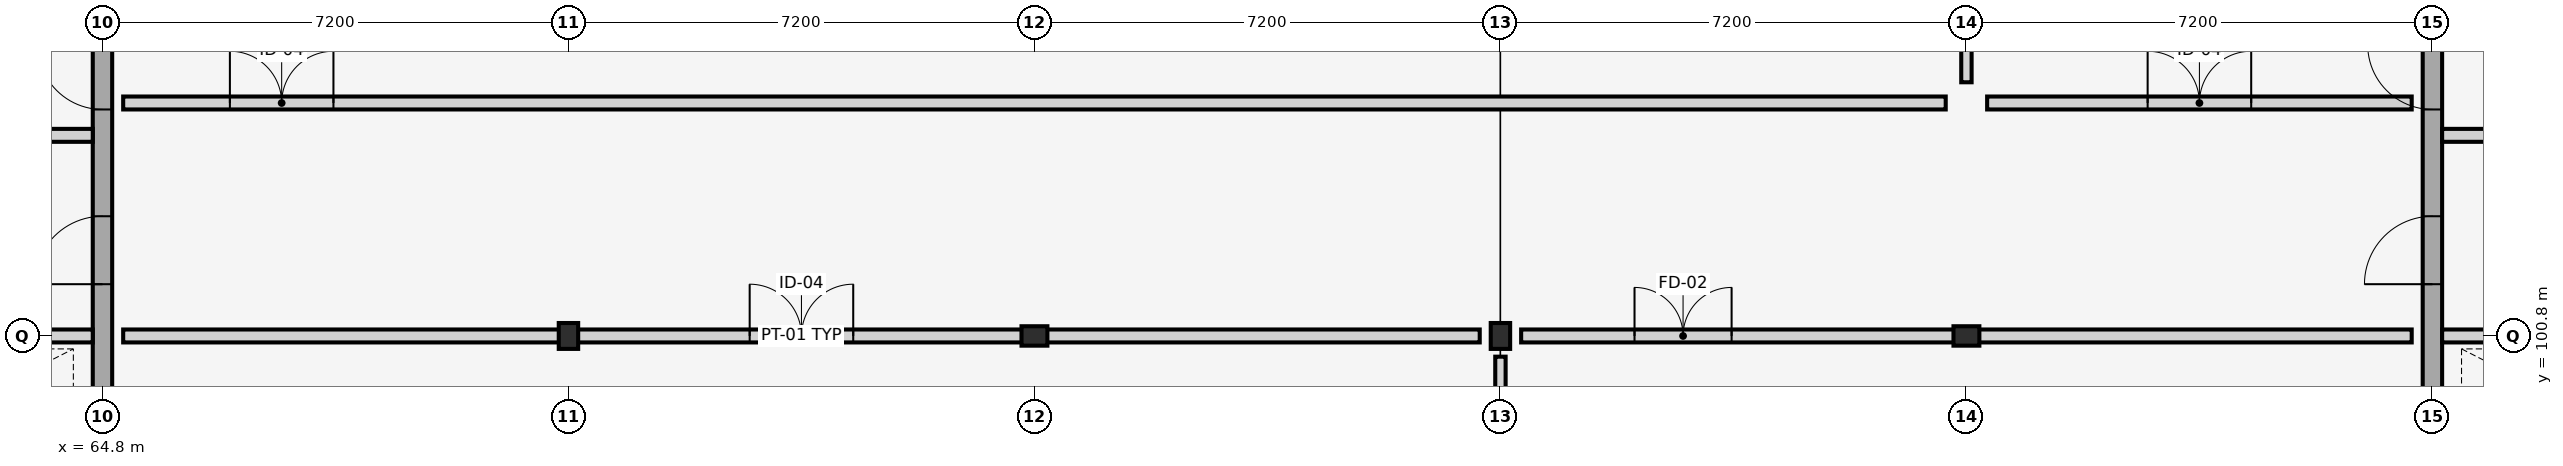
"""IFC4 building model, lengths in metres.
Left out: names, types, materials, properties, quantities, classifications, styles, units other than length and angle.
Written with IfcOpenShell. Run it as: python <this file> out.ifc"""

import sys

from ifc_helpers import new_model, si_unit, direction, frame, frame_2d, origin, origin_2d, place, context, subcontext, project, spatial, rectangle, i_section, extrude, element, fill, save


model = new_model("IFC4")
c1 = context("Model", 3, precision=1e-05, world=origin(), true_north=direction((0.0, 1.0)))
c2 = subcontext(c1, "Body", "Model", "MODEL_VIEW")
j1 = project(units=[si_unit("LENGTHUNIT", "METRE"), si_unit("PLANEANGLEUNIT", "RADIAN")], contexts=[c1])
p1 = place(None, origin())
s1 = spatial("IfcSite", under=j1, at=p1, CompositionType="ELEMENT")
p2 = place(p1, origin())
s2 = spatial("IfcBuilding", under=s1, at=p2, CompositionType="ELEMENT")
p3 = place(p2, frame((0.0, 0.0, 8.7)))
s3 = spatial("IfcBuildingStorey", under=s2, at=p3, CompositionType="ELEMENT", Elevation=8.7)
for number, where, z_axis, x_axis in (
    (1, (72.0, 100.8, 0.0), (0.0, 0.0, 1.0), (1.0, 0.0, 0.0)),
    (2, (79.2, 100.8, 0.0), (0.0, 0.0, 1.0), (0.0, 1.0, 0.0)),
    (3, (86.4, 100.8, 0.0), (0.0, 0.0, 1.0), (1.0, 0.0, 0.0)),
    (4, (93.6, 100.8, 0.0), (0.0, 0.0, 1.0), (0.0, 1.0, 0.0)),
):
    element("IfcColumn", number, at=place(p3, frame(where, z_axis=z_axis, x_axis=x_axis)), inside=s3, PredefinedType="COLUMN", context=c2, shape_type="SweptSolid", body=[
        extrude(i_section(OverallWidth=0.3, OverallDepth=0.4, WebThickness=0.013, FlangeThickness=0.024, FilletRadius=0.027, at=origin_2d()), origin(), (0.0, 0.0, 1.0), 4.2),
    ])
p4 = place(p3, frame((64.8, 93.75, 0.0), z_axis=(0.0, 0.0, 1.0), x_axis=(0.0, 1.0, 0.0)))
e5 = element("IfcWall", 5, at=p4, inside=s3, PredefinedType="SHEAR", context=c2, shape_type="SweptSolid", body=[
    extrude(rectangle(XDim=14.1, YDim=0.3, at=frame_2d((7.05, 0.0))), origin(), (0.0, 0.0, 1.0), 3.96),
])
p5 = place(p4, frame((3.55, 0.0, 0.0)))
e6 = element("IfcOpeningElement", 6, at=p5, cuts=e5, PredefinedType="OPENING", context=c2, shape_type="SweptSolid", body=[
    extrude(rectangle(XDim=1.3, YDim=2.2, at=frame_2d((0.65, 1.1))), frame((0.0, 0.16, 0.0), z_axis=(0.0, -1.0, 0.0), x_axis=(1.0, 0.0, 0.0)), (0.0, 0.0, 1.0), 0.32),
])
p6 = place(p4, frame((7.85, 0.0, 0.0)))
e7 = element("IfcOpeningElement", 7, at=p6, cuts=e5, PredefinedType="OPENING", context=c2, shape_type="SweptSolid", body=[
    extrude(rectangle(XDim=1.05, YDim=2.15, at=frame_2d((0.525, 1.075))), frame((0.0, 0.16, 0.0), z_axis=(0.0, -1.0, 0.0), x_axis=(1.0, 0.0, 0.0)), (0.0, 0.0, 1.0), 0.32),
])
p7 = place(p4, frame((10.55, 0.0, 0.0)))
e8 = element("IfcOpeningElement", 8, at=p7, cuts=e5, PredefinedType="OPENING", context=c2, shape_type="SweptSolid", body=[
    extrude(rectangle(XDim=1.0, YDim=2.15, at=frame_2d((0.5, 1.075))), frame((0.0, 0.16, 0.0), z_axis=(0.0, -1.0, 0.0), x_axis=(1.0, 0.0, 0.0)), (0.0, 0.0, 1.0), 0.32),
])
for number, where, z_axis, x_axis in (
    (9, (61.1, 100.8, 0.0), (0.0, 0.0, 1.0), (1.0, 0.0, 0.0)),
    (10, (61.1, 103.9, 0.0), (0.0, 0.0, 1.0), (1.0, 0.0, 0.0)),
):
    element("IfcWall", number, at=place(p3, frame(where, z_axis=z_axis, x_axis=x_axis)), inside=s3, PredefinedType="PLUMBINGWALL", context=c2, shape_type="SweptSolid", body=[
        extrude(rectangle(XDim=3.55, YDim=0.2, at=frame_2d((1.775, 0.0))), origin(), (0.0, 0.0, 1.0), 3.38),
    ])
p8 = place(p3, frame((100.8, 93.75, 0.0), z_axis=(0.0, 0.0, 1.0), x_axis=(0.0, 1.0, 0.0)))
e11 = element("IfcWall", 11, at=p8, inside=s3, PredefinedType="SHEAR", context=c2, shape_type="SweptSolid", body=[
    extrude(rectangle(XDim=14.1, YDim=0.3, at=frame_2d((7.05, 0.0))), origin(), (0.0, 0.0, 1.0), 3.96),
])
p9 = place(p8, frame((3.55, 0.0, 0.0)))
e12 = element("IfcOpeningElement", 12, at=p9, cuts=e11, PredefinedType="OPENING", context=c2, shape_type="SweptSolid", body=[
    extrude(rectangle(XDim=1.3, YDim=2.2, at=frame_2d((0.65, 1.1))), frame((0.0, 0.16, 0.0), z_axis=(0.0, -1.0, 0.0), x_axis=(1.0, 0.0, 0.0)), (0.0, 0.0, 1.0), 0.32),
])
p10 = place(p8, frame((7.85, 0.0, 0.0)))
e13 = element("IfcOpeningElement", 13, at=p10, cuts=e11, PredefinedType="OPENING", context=c2, shape_type="SweptSolid", body=[
    extrude(rectangle(XDim=1.05, YDim=2.15, at=frame_2d((0.525, 1.075))), frame((0.0, 0.16, 0.0), z_axis=(0.0, -1.0, 0.0), x_axis=(1.0, 0.0, 0.0)), (0.0, 0.0, 1.0), 0.32),
])
p11 = place(p8, frame((10.55, 0.0, 0.0)))
e14 = element("IfcOpeningElement", 14, at=p11, cuts=e11, PredefinedType="OPENING", context=c2, shape_type="SweptSolid", body=[
    extrude(rectangle(XDim=1.0, YDim=2.15, at=frame_2d((0.5, 1.075))), frame((0.0, 0.16, 0.0), z_axis=(0.0, -1.0, 0.0), x_axis=(1.0, 0.0, 0.0)), (0.0, 0.0, 1.0), 0.32),
])
for number, where, z_axis, x_axis in (
    (15, (100.95, 100.8, 0.0), (0.0, 0.0, 1.0), (1.0, 0.0, 0.0)),
    (16, (100.95, 103.9, 0.0), (0.0, 0.0, 1.0), (1.0, 0.0, 0.0)),
):
    element("IfcWall", number, at=place(p3, frame(where, z_axis=z_axis, x_axis=x_axis)), inside=s3, PredefinedType="PLUMBINGWALL", context=c2, shape_type="SweptSolid", body=[
        extrude(rectangle(XDim=3.55, YDim=0.2, at=frame_2d((1.775, 0.0))), origin(), (0.0, 0.0, 1.0), 3.38),
    ])
p12 = place(p3, frame((65.12, 100.8, 0.0), z_axis=(0.0, 0.0, 1.0), x_axis=(1.0, 0.0, 0.0)))
e17 = element("IfcWall", 17, at=p12, inside=s3, PredefinedType="PARTITIONING", context=c2, shape_type="SweptSolid", body=[
    extrude(rectangle(XDim=20.96, YDim=0.2, at=frame_2d((10.48, 0.0))), origin(), (0.0, 0.0, 1.0), 3.15),
])
p13 = place(p12, frame((9.68, 0.0, 0.0)))
e18 = element("IfcOpeningElement", 18, at=p13, cuts=e17, PredefinedType="OPENING", context=c2, shape_type="SweptSolid", body=[
    extrude(rectangle(XDim=1.6, YDim=2.35, at=frame_2d((0.8, 1.175))), frame((0.0, 0.11, 0.0), z_axis=(0.0, -1.0, 0.0), x_axis=(1.0, 0.0, 0.0)), (0.0, 0.0, 1.0), 0.22),
])
p14 = place(p3, frame((86.72, 100.8, 0.0), z_axis=(0.0, 0.0, 1.0), x_axis=(1.0, 0.0, 0.0)))
e19 = element("IfcWall", 19, at=p14, inside=s3, PredefinedType="PARTITIONING", context=c2, shape_type="SweptSolid", body=[
    extrude(rectangle(XDim=13.76, YDim=0.2, at=frame_2d((6.88, 0.0))), origin(), (0.0, 0.0, 1.0), 3.15),
])
p15 = place(p14, frame((1.752, 0.0, 0.0)))
e20 = element("IfcOpeningElement", 20, at=p15, cuts=e19, PredefinedType="OPENING", context=c2, shape_type="SweptSolid", body=[
    extrude(rectangle(XDim=1.5, YDim=2.25, at=frame_2d((0.75, 1.125))), frame((0.0, 0.11, 0.0), z_axis=(0.0, -1.0, 0.0), x_axis=(1.0, 0.0, 0.0)), (0.0, 0.0, 1.0), 0.22),
])
p16 = place(p3, frame((65.12, 104.4, 0.0), z_axis=(0.0, 0.0, 1.0), x_axis=(1.0, 0.0, 0.0)))
e21 = element("IfcWall", 21, at=p16, inside=s3, PredefinedType="PARTITIONING", context=c2, shape_type="SweptSolid", body=[
    extrude(rectangle(XDim=28.16, YDim=0.2, at=frame_2d((14.08, 0.0))), origin(), (0.0, 0.0, 1.0), 3.15),
])
p17 = place(p16, frame((1.649, 0.0, 0.0)))
e22 = element("IfcOpeningElement", 22, at=p17, cuts=e21, PredefinedType="OPENING", context=c2, shape_type="SweptSolid", body=[
    extrude(rectangle(XDim=1.6, YDim=2.35, at=frame_2d((0.8, 1.175))), frame((0.0, 0.11, 0.0), z_axis=(0.0, -1.0, 0.0), x_axis=(1.0, 0.0, 0.0)), (0.0, 0.0, 1.0), 0.22),
])
p18 = place(p3, frame((93.92, 104.4, 0.0), z_axis=(0.0, 0.0, 1.0), x_axis=(1.0, 0.0, 0.0)))
e23 = element("IfcWall", 23, at=p18, inside=s3, PredefinedType="PARTITIONING", context=c2, shape_type="SweptSolid", body=[
    extrude(rectangle(XDim=6.56, YDim=0.2, at=frame_2d((3.28, 0.0))), origin(), (0.0, 0.0, 1.0), 3.15),
])
p19 = place(p18, frame((2.48, 0.0, 0.0)))
e24 = element("IfcOpeningElement", 24, at=p19, cuts=e23, PredefinedType="OPENING", context=c2, shape_type="SweptSolid", body=[
    extrude(rectangle(XDim=1.6, YDim=2.35, at=frame_2d((0.8, 1.175))), frame((0.0, 0.11, 0.0), z_axis=(0.0, -1.0, 0.0), x_axis=(1.0, 0.0, 0.0)), (0.0, 0.0, 1.0), 0.22),
])
p20 = place(p3, frame((86.4, 86.72, 0.0), z_axis=(0.0, 0.0, 1.0), x_axis=(0.0, 1.0, 0.0)))
e25 = element("IfcWall", 25, at=p20, inside=s3, PredefinedType="PARTITIONING", context=c2, shape_type="SweptSolid", body=[
    extrude(rectangle(XDim=13.76, YDim=0.16, at=frame_2d((6.88, 0.0))), origin(), (0.0, 0.0, 1.0), 3.15),
])
p21 = place(p20, frame((1.427, 0.0, 0.0)))
e26 = element("IfcOpeningElement", 26, at=p21, cuts=e25, PredefinedType="OPENING", context=c2, shape_type="SweptSolid", body=[
    extrude(rectangle(XDim=2.15, YDim=2.65, at=frame_2d((1.075, 1.325))), frame((0.0, 0.09, 0.0), z_axis=(0.0, -1.0, 0.0), x_axis=(1.0, 0.0, 0.0)), (0.0, 0.0, 1.0), 0.18),
])
p22 = place(p3, frame((93.6, 104.72, 0.0), z_axis=(0.0, 0.0, 1.0), x_axis=(0.0, 1.0, 0.0)))
e27 = element("IfcWall", 27, at=p22, inside=s3, PredefinedType="PARTITIONING", context=c2, shape_type="SweptSolid", body=[
    extrude(rectangle(XDim=10.16, YDim=0.16, at=frame_2d((5.08, 0.0))), origin(), (0.0, 0.0, 1.0), 3.15),
])
p23 = place(p22, frame((4.18, 0.0, 0.0)))
e28 = element("IfcOpeningElement", 28, at=p23, cuts=e27, PredefinedType="OPENING", context=c2, shape_type="SweptSolid", body=[
    extrude(rectangle(XDim=1.8, YDim=2.4, at=frame_2d((0.9, 1.2))), frame((0.0, 0.09, 0.0), z_axis=(0.0, -1.0, 0.0), x_axis=(1.0, 0.0, 0.0)), (0.0, 0.0, 1.0), 0.18),
])
p24 = place(p6, origin())
e29 = element("IfcDoor", 29, at=p24, inside=s3, OperationType="SINGLE_SWING_LEFT", PredefinedType="DOOR", context=c2, shape_type="SweptSolid", body=[
    extrude(rectangle(XDim=1.05, YDim=2.15, at=frame_2d((0.525, 1.075))), frame((0.0, 0.025, 0.0), z_axis=(0.0, -1.0, 0.0), x_axis=(1.0, 0.0, 0.0)), (0.0, 0.0, 1.0), 0.05),
])
fill(e7, e29)
p25 = place(p7, origin())
e30 = element("IfcDoor", 30, at=p25, inside=s3, OperationType="SINGLE_SWING_RIGHT", PredefinedType="DOOR", context=c2, shape_type="SweptSolid", body=[
    extrude(rectangle(XDim=1.0, YDim=2.15, at=frame_2d((0.5, 1.075))), frame((0.0, 0.025, 0.0), z_axis=(0.0, -1.0, 0.0), x_axis=(1.0, 0.0, 0.0)), (0.0, 0.0, 1.0), 0.05),
])
fill(e8, e30)
p26 = place(p10, origin())
e31 = element("IfcDoor", 31, at=p26, inside=s3, OperationType="SINGLE_SWING_LEFT", PredefinedType="DOOR", context=c2, shape_type="SweptSolid", body=[
    extrude(rectangle(XDim=1.05, YDim=2.15, at=frame_2d((0.525, 1.075))), frame((0.0, 0.025, 0.0), z_axis=(0.0, -1.0, 0.0), x_axis=(1.0, 0.0, 0.0)), (0.0, 0.0, 1.0), 0.05),
])
fill(e13, e31)
p27 = place(p11, origin())
e32 = element("IfcDoor", 32, at=p27, inside=s3, OperationType="SINGLE_SWING_RIGHT", PredefinedType="DOOR", context=c2, shape_type="SweptSolid", body=[
    extrude(rectangle(XDim=1.0, YDim=2.15, at=frame_2d((0.5, 1.075))), frame((0.0, 0.025, 0.0), z_axis=(0.0, -1.0, 0.0), x_axis=(1.0, 0.0, 0.0)), (0.0, 0.0, 1.0), 0.05),
])
fill(e14, e32)
p28 = place(p13, origin())
e33 = element("IfcDoor", 33, at=p28, inside=s3, OperationType="DOUBLE_DOOR_SINGLE_SWING", PredefinedType="DOOR", context=c2, shape_type="SweptSolid", body=[
    extrude(rectangle(XDim=1.6, YDim=2.35, at=frame_2d((0.8, 1.175))), frame((0.0, 0.025, 0.0), z_axis=(0.0, -1.0, 0.0), x_axis=(1.0, 0.0, 0.0)), (0.0, 0.0, 1.0), 0.05),
])
fill(e18, e33)
p29 = place(p15, origin())
e34 = element("IfcDoor", 34, at=p29, inside=s3, OperationType="DOUBLE_DOOR_SINGLE_SWING", PredefinedType="DOOR", context=c2, shape_type="SweptSolid", body=[
    extrude(rectangle(XDim=1.5, YDim=2.25, at=frame_2d((0.75, 1.125))), frame((0.0, 0.025, 0.0), z_axis=(0.0, -1.0, 0.0), x_axis=(1.0, 0.0, 0.0)), (0.0, 0.0, 1.0), 0.05),
])
fill(e20, e34)
p30 = place(p17, origin())
e35 = element("IfcDoor", 35, at=p30, inside=s3, OperationType="DOUBLE_DOOR_SINGLE_SWING", PredefinedType="DOOR", context=c2, shape_type="SweptSolid", body=[
    extrude(rectangle(XDim=1.6, YDim=2.35, at=frame_2d((0.8, 1.175))), frame((0.0, 0.025, 0.0), z_axis=(0.0, -1.0, 0.0), x_axis=(1.0, 0.0, 0.0)), (0.0, 0.0, 1.0), 0.05),
])
fill(e22, e35)
p31 = place(p19, origin())
e36 = element("IfcDoor", 36, at=p31, inside=s3, OperationType="DOUBLE_DOOR_SINGLE_SWING", PredefinedType="DOOR", context=c2, shape_type="SweptSolid", body=[
    extrude(rectangle(XDim=1.6, YDim=2.35, at=frame_2d((0.8, 1.175))), frame((0.0, 0.025, 0.0), z_axis=(0.0, -1.0, 0.0), x_axis=(1.0, 0.0, 0.0)), (0.0, 0.0, 1.0), 0.05),
])
fill(e24, e36)
save(model, sys.argv[1])
